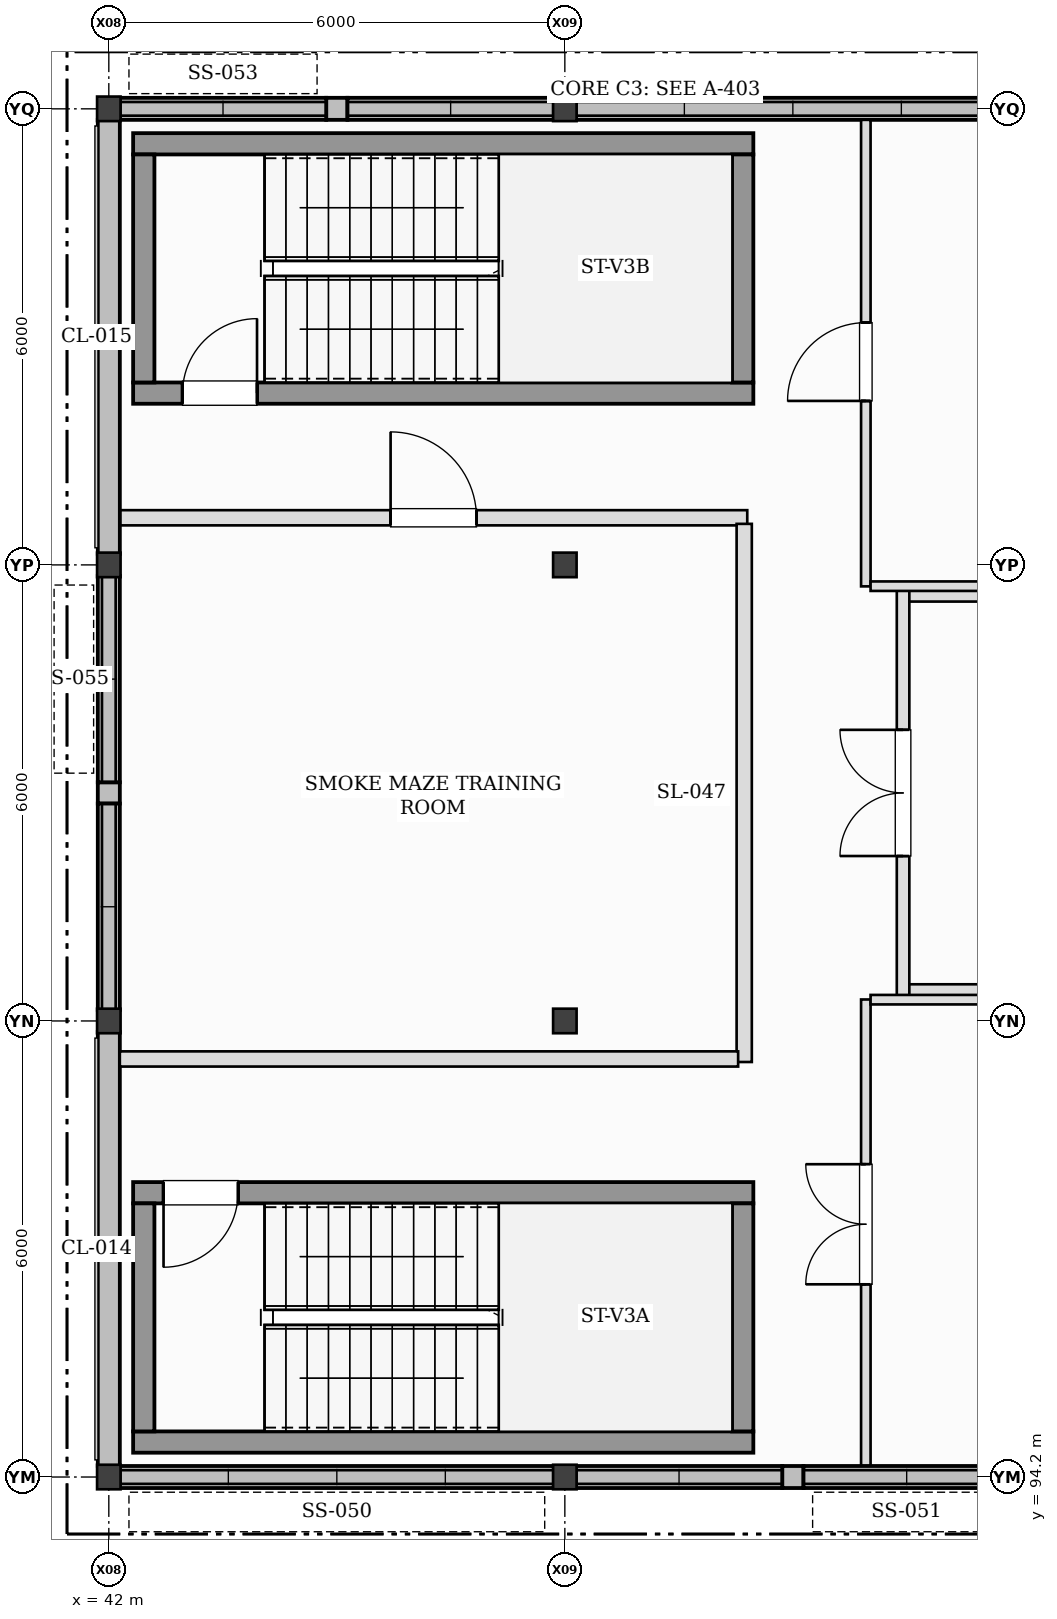
"""IFC4 building model, lengths in metres.
Left out: names, types, materials, properties, quantities, classifications, styles, units other than length and angle.
Written with IfcOpenShell. Run it as: python <this file> out.ifc"""

import sys

from ifc_helpers import new_model, si_unit, direction, frame, frame_2d, origin, origin_2d, place, context, subcontext, project, spatial, rectangle, i_section, extrude, element, fill, save


model = new_model("IFC4")
c1 = context("Model", 3, precision=1e-05, world=origin(), true_north=direction((0.0, 1.0)))
c2 = subcontext(c1, "Body", "Model", "MODEL_VIEW")
j1 = project(units=[si_unit("LENGTHUNIT", "METRE"), si_unit("PLANEANGLEUNIT", "RADIAN")], contexts=[c1])
p1 = place(None, origin())
s1 = spatial("IfcSite", under=j1, at=p1, CompositionType="ELEMENT")
p2 = place(p1, origin())
s2 = spatial("IfcBuilding", under=s1, at=p2, CompositionType="ELEMENT")
p3 = place(p2, frame((0.0, 0.0, 14.0)))
s3 = spatial("IfcBuildingStorey", under=s2, at=p3, CompositionType="ELEMENT", Elevation=14.0)
for number, where, z_axis, x_axis in (
    (1, (42.0, 94.2, 0.0), (0.0, 0.0, 1.0), (1.0, 0.0, 0.0)),
    (2, (42.0, 100.2, 0.0), (0.0, 0.0, 1.0), (1.0, 0.0, 0.0)),
    (3, (42.0, 106.2, 0.0), (0.0, 0.0, 1.0), (1.0, 0.0, 0.0)),
    (4, (42.0, 112.2, 0.0), (0.0, 0.0, 1.0), (1.0, 0.0, 0.0)),
    (5, (48.0, 94.2, 0.0), (0.0, 0.0, 1.0), (1.0, 0.0, 0.0)),
    (6, (48.0, 100.2, 0.0), (0.0, 0.0, 1.0), (1.0, 0.0, 0.0)),
    (7, (48.0, 106.2, 0.0), (0.0, 0.0, 1.0), (1.0, 0.0, 0.0)),
    (8, (48.0, 112.2, 0.0), (0.0, 0.0, 1.0), (1.0, 0.0, 0.0)),
):
    element("IfcColumn", number, at=place(p3, frame(where, z_axis=z_axis, x_axis=x_axis)), inside=s3, PredefinedType="COLUMN", context=c2, shape_type="SweptSolid", body=[
        extrude(i_section(OverallWidth=0.309, OverallDepth=0.323, WebThickness=0.013, FlangeThickness=0.023, at=origin_2d()), origin(), (0.0, 0.0, 1.0), 4.0),
    ])
p4 = place(p3, frame((42.145, 94.2, 0.0), z_axis=(0.0, 0.0, 1.0), x_axis=(1.0, 0.0, 0.0)))
e9 = element("IfcWall", 9, at=p4, inside=s3, PredefinedType="STANDARD", context=c2, shape_type="SweptSolid", body=[
    extrude(rectangle(XDim=5.71, YDim=0.29, at=frame_2d((2.855, 0.0))), origin(), (0.0, 0.0, 1.0), 0.56),
])
p5 = place(p3, frame((50.86, 94.2, 0.0), z_axis=(0.0, 0.0, 1.0), x_axis=(1.0, 0.0, 0.0)))
e10 = element("IfcWall", 10, at=p5, inside=s3, PredefinedType="STANDARD", context=c2, shape_type="SweptSolid", body=[
    extrude(rectangle(XDim=0.28, YDim=0.29, at=frame_2d((0.14, 0.0))), origin(), (0.0, 0.0, 1.0), 3.269),
])
p6 = place(p3, frame((48.145, 94.2, 0.0), z_axis=(0.0, 0.0, 1.0), x_axis=(1.0, 0.0, 0.0)))
e11 = element("IfcWall", 11, at=p6, inside=s3, PredefinedType="STANDARD", context=c2, shape_type="SweptSolid", body=[
    extrude(rectangle(XDim=2.715, YDim=0.29, at=frame_2d((1.357, 0.0))), origin(), (0.0, 0.0, 1.0), 0.68),
])
p7 = place(p3, frame((51.14, 94.2, 0.0), z_axis=(0.0, 0.0, 1.0), x_axis=(1.0, 0.0, 0.0)))
e12 = element("IfcWall", 12, at=p7, inside=s3, PredefinedType="STANDARD", context=c2, shape_type="SweptSolid", body=[
    extrude(rectangle(XDim=2.715, YDim=0.29, at=frame_2d((1.357, 0.0))), origin(), (0.0, 0.0, 1.0), 0.8),
])
p8 = place(p3, frame((45.14, 112.2, 0.0), z_axis=(0.0, 0.0, 1.0), x_axis=(-1.0, 0.0, 0.0)))
e13 = element("IfcWall", 13, at=p8, inside=s3, PredefinedType="STANDARD", context=c2, shape_type="SweptSolid", body=[
    extrude(rectangle(XDim=0.28, YDim=0.29, at=frame_2d((0.14, 0.0))), origin(), (0.0, 0.0, 1.0), 3.269),
])
p9 = place(p3, frame((47.855, 112.2, 0.0), z_axis=(0.0, 0.0, 1.0), x_axis=(-1.0, 0.0, 0.0)))
e14 = element("IfcWall", 14, at=p9, inside=s3, PredefinedType="STANDARD", context=c2, shape_type="SweptSolid", body=[
    extrude(rectangle(XDim=2.715, YDim=0.29, at=frame_2d((1.357, 0.0))), origin(), (0.0, 0.0, 1.0), 0.92),
])
p10 = place(p3, frame((44.86, 112.2, 0.0), z_axis=(0.0, 0.0, 1.0), x_axis=(-1.0, 0.0, 0.0)))
e15 = element("IfcWall", 15, at=p10, inside=s3, PredefinedType="STANDARD", context=c2, shape_type="SweptSolid", body=[
    extrude(rectangle(XDim=2.715, YDim=0.29, at=frame_2d((1.357, 0.0))), origin(), (0.0, 0.0, 1.0), 0.32),
])
p11 = place(p3, frame((53.855, 112.2, 0.0), z_axis=(0.0, 0.0, 1.0), x_axis=(-1.0, 0.0, 0.0)))
e16 = element("IfcWall", 16, at=p11, inside=s3, PredefinedType="STANDARD", context=c2, shape_type="SweptSolid", body=[
    extrude(rectangle(XDim=5.71, YDim=0.29, at=frame_2d((2.855, 0.0))), origin(), (0.0, 0.0, 1.0), 0.44),
])
p12 = place(p3, frame((42.0, 100.055, 0.0), z_axis=(0.0, 0.0, 1.0), x_axis=(0.0, -1.0, 0.0)))
e17 = element("IfcWall", 17, at=p12, inside=s3, PredefinedType="STANDARD", context=c2, shape_type="SweptSolid", body=[
    extrude(rectangle(XDim=5.71, YDim=0.29, at=frame_2d((2.855, 0.0))), origin(), (0.0, 0.0, 1.0), 3.273),
])
p13 = place(p3, frame((42.0, 103.34, 0.0), z_axis=(0.0, 0.0, 1.0), x_axis=(0.0, -1.0, 0.0)))
e18 = element("IfcWall", 18, at=p13, inside=s3, PredefinedType="STANDARD", context=c2, shape_type="SweptSolid", body=[
    extrude(rectangle(XDim=0.28, YDim=0.29, at=frame_2d((0.14, 0.0))), origin(), (0.0, 0.0, 1.0), 3.273),
])
p14 = place(p3, frame((42.0, 106.055, 0.0), z_axis=(0.0, 0.0, 1.0), x_axis=(0.0, -1.0, 0.0)))
e19 = element("IfcWall", 19, at=p14, inside=s3, PredefinedType="STANDARD", context=c2, shape_type="SweptSolid", body=[
    extrude(rectangle(XDim=2.715, YDim=0.29, at=frame_2d((1.357, 0.0))), origin(), (0.0, 0.0, 1.0), 0.56),
])
p15 = place(p3, frame((42.0, 103.06, 0.0), z_axis=(0.0, 0.0, 1.0), x_axis=(0.0, -1.0, 0.0)))
e20 = element("IfcWall", 20, at=p15, inside=s3, PredefinedType="STANDARD", context=c2, shape_type="SweptSolid", body=[
    extrude(rectangle(XDim=2.715, YDim=0.29, at=frame_2d((1.357, 0.0))), origin(), (0.0, 0.0, 1.0), 0.68),
])
p16 = place(p3, frame((42.0, 112.055, 0.0), z_axis=(0.0, 0.0, 1.0), x_axis=(0.0, -1.0, 0.0)))
e21 = element("IfcWall", 21, at=p16, inside=s3, PredefinedType="STANDARD", context=c2, shape_type="SweptSolid", body=[
    extrude(rectangle(XDim=5.71, YDim=0.29, at=frame_2d((2.855, 0.0))), origin(), (0.0, 0.0, 1.0), 3.273),
])
p17 = place(p3, frame((42.32, 94.66, 0.0), z_axis=(0.0, 0.0, 1.0), x_axis=(1.0, 0.0, 0.0)))
e22 = element("IfcWall", 22, at=p17, inside=s3, PredefinedType="SHEAR", context=c2, shape_type="SweptSolid", body=[
    extrude(rectangle(XDim=8.16, YDim=0.28, at=frame_2d((4.08, 0.0))), origin(), (0.0, 0.0, 1.0), 4.0),
])
p18 = place(p3, frame((50.48, 97.94, 0.0), z_axis=(0.0, 0.0, 1.0), x_axis=(-1.0, 0.0, 0.0)))
e23 = element("IfcWall", 23, at=p18, inside=s3, PredefinedType="SHEAR", context=c2, shape_type="SweptSolid", body=[
    extrude(rectangle(XDim=8.16, YDim=0.28, at=frame_2d((4.08, 0.0))), origin(), (0.0, 0.0, 1.0), 4.0),
])
p19 = place(p18, frame((6.78, 0.0, 0.0)))
e24 = element("IfcOpeningElement", 24, at=p19, cuts=e23, PredefinedType="OPENING", context=c2, shape_type="SweptSolid", body=[
    extrude(rectangle(XDim=0.98, YDim=2.15, at=frame_2d((0.49, 1.075))), frame((0.0, 0.15, 0.0), z_axis=(0.0, -1.0, 0.0), x_axis=(1.0, 0.0, 0.0)), (0.0, 0.0, 1.0), 0.3),
])
for number, where, z_axis, x_axis in (
    (25, (42.46, 97.8, 0.0), (0.0, 0.0, 1.0), (0.0, -1.0, 0.0)),
    (26, (50.34, 94.8, 0.0), (0.0, 0.0, 1.0), (0.0, 1.0, 0.0)),
):
    element("IfcWall", number, at=place(p3, frame(where, z_axis=z_axis, x_axis=x_axis)), inside=s3, PredefinedType="SHEAR", context=c2, shape_type="SweptSolid", body=[
        extrude(rectangle(XDim=3.0, YDim=0.28, at=frame_2d((1.5, 0.0))), origin(), (0.0, 0.0, 1.0), 4.0),
    ])
p20 = place(p3, frame((42.32, 108.46, 0.0), z_axis=(0.0, 0.0, 1.0), x_axis=(1.0, 0.0, 0.0)))
e27 = element("IfcWall", 27, at=p20, inside=s3, PredefinedType="SHEAR", context=c2, shape_type="SweptSolid", body=[
    extrude(rectangle(XDim=8.16, YDim=0.28, at=frame_2d((4.08, 0.0))), origin(), (0.0, 0.0, 1.0), 4.0),
])
p21 = place(p20, frame((0.65, 0.0, 0.0)))
e28 = element("IfcOpeningElement", 28, at=p21, cuts=e27, PredefinedType="OPENING", context=c2, shape_type="SweptSolid", body=[
    extrude(rectangle(XDim=0.98, YDim=2.15, at=frame_2d((0.49, 1.075))), frame((0.0, 0.15, 0.0), z_axis=(0.0, -1.0, 0.0), x_axis=(1.0, 0.0, 0.0)), (0.0, 0.0, 1.0), 0.3),
])
p22 = place(p3, frame((50.48, 111.74, 0.0), z_axis=(0.0, 0.0, 1.0), x_axis=(-1.0, 0.0, 0.0)))
e29 = element("IfcWall", 29, at=p22, inside=s3, PredefinedType="SHEAR", context=c2, shape_type="SweptSolid", body=[
    extrude(rectangle(XDim=8.16, YDim=0.28, at=frame_2d((4.08, 0.0))), origin(), (0.0, 0.0, 1.0), 4.0),
])
for number, where, z_axis, x_axis in (
    (30, (42.46, 111.6, 0.0), (0.0, 0.0, 1.0), (0.0, -1.0, 0.0)),
    (31, (50.34, 108.6, 0.0), (0.0, 0.0, 1.0), (0.0, 1.0, 0.0)),
):
    element("IfcWall", number, at=place(p3, frame(where, z_axis=z_axis, x_axis=x_axis)), inside=s3, PredefinedType="SHEAR", context=c2, shape_type="SweptSolid", body=[
        extrude(rectangle(XDim=3.0, YDim=0.28, at=frame_2d((1.5, 0.0))), origin(), (0.0, 0.0, 1.0), 4.0),
    ])
for number, where, z_axis, x_axis in (
    (32, (52.45, 100.6, 0.0), (0.0, 0.0, 1.0), (1.0, 0.0, 0.0)),
    (33, (56.448, 105.8, 0.0), (0.0, 0.0, 1.0), (-1.0, 0.0, 0.0)),
):
    element("IfcWall", number, at=place(p3, frame(where, z_axis=z_axis, x_axis=x_axis)), inside=s3, PredefinedType="PARTITIONING", context=c2, shape_type="SweptSolid", body=[
        extrude(rectangle(XDim=3.998, YDim=0.165, at=frame_2d((1.999, 0.0))), origin(), (0.0, 0.0, 1.0), 3.76),
    ])
p23 = place(p3, frame((52.45, 100.52, 0.0), z_axis=(0.0, 0.0, 1.0), x_axis=(0.0, 1.0, 0.0)))
e34 = element("IfcWall", 34, at=p23, inside=s3, PredefinedType="PARTITIONING", context=c2, shape_type="SweptSolid", body=[
    extrude(rectangle(XDim=5.36, YDim=0.165, at=frame_2d((2.68, 0.0))), origin(), (0.0, 0.0, 1.0), 3.76),
])
p24 = place(p23, frame((1.85, 0.0, 0.0)))
e35 = element("IfcOpeningElement", 35, at=p24, cuts=e34, PredefinedType="OPENING", context=c2, shape_type="SweptSolid", body=[
    extrude(rectangle(XDim=1.66, YDim=2.2, at=frame_2d((0.83, 1.1))), frame((0.0, 0.093, 0.0), z_axis=(0.0, -1.0, 0.0), x_axis=(1.0, 0.0, 0.0)), (0.0, 0.0, 1.0), 0.185),
])
p25 = place(p3, frame((42.145, 106.82, 0.0), z_axis=(0.0, 0.0, 1.0), x_axis=(1.0, 0.0, 0.0)))
e36 = element("IfcWall", 36, at=p25, inside=s3, PredefinedType="PARTITIONING", context=c2, shape_type="SweptSolid", body=[
    extrude(rectangle(XDim=8.255, YDim=0.2, at=frame_2d((4.127, 0.0))), origin(), (0.0, 0.0, 1.0), 3.76),
])
p26 = place(p25, frame((3.562, 0.0, 0.0)))
e37 = element("IfcOpeningElement", 37, at=p26, cuts=e36, PredefinedType="OPENING", context=c2, shape_type="SweptSolid", body=[
    extrude(rectangle(XDim=1.13, YDim=2.18, at=frame_2d((0.565, 1.09))), frame((0.0, 0.11, 0.0), z_axis=(0.0, -1.0, 0.0), x_axis=(1.0, 0.0, 0.0)), (0.0, 0.0, 1.0), 0.22),
])
p27 = place(p3, frame((50.36, 106.74, 0.0), z_axis=(0.0, 0.0, 1.0), x_axis=(0.0, -1.0, 0.0)))
e38 = element("IfcWall", 38, at=p27, inside=s3, PredefinedType="PARTITIONING", context=c2, shape_type="SweptSolid", body=[
    extrude(rectangle(XDim=7.08, YDim=0.2, at=frame_2d((3.54, 0.0))), origin(), (0.0, 0.0, 1.0), 3.76),
])
p28 = place(p3, frame((50.28, 99.7, 0.0), z_axis=(0.0, 0.0, 1.0), x_axis=(-1.0, 0.0, 0.0)))
e39 = element("IfcWall", 39, at=p28, inside=s3, PredefinedType="PARTITIONING", context=c2, shape_type="SweptSolid", body=[
    extrude(rectangle(XDim=8.135, YDim=0.2, at=frame_2d((4.067, 0.0))), origin(), (0.0, 0.0, 1.0), 3.76),
])
p29 = place(p3, frame((51.96, 94.345, 0.0), z_axis=(0.0, 0.0, 1.0), x_axis=(0.0, 1.0, 0.0)))
e40 = element("IfcWall", 40, at=p29, inside=s3, PredefinedType="PARTITIONING", context=c2, shape_type="SweptSolid", body=[
    extrude(rectangle(XDim=6.137, YDim=0.125, at=frame_2d((3.069, 0.0))), origin(), (0.0, 0.0, 1.0), 3.374),
])
p30 = place(p29, frame((2.39, 0.0, 0.0)))
e41 = element("IfcOpeningElement", 41, at=p30, cuts=e40, PredefinedType="OPENING", context=c2, shape_type="SweptSolid", body=[
    extrude(rectangle(XDim=1.58, YDim=2.2, at=frame_2d((0.79, 1.1))), frame((0.0, 0.073, 0.0), z_axis=(0.0, -1.0, 0.0), x_axis=(1.0, 0.0, 0.0)), (0.0, 0.0, 1.0), 0.145),
])
p31 = place(p3, frame((52.022, 100.48, 0.0), z_axis=(0.0, 0.0, 1.0), x_axis=(1.0, 0.0, 0.0)))
e42 = element("IfcWall", 42, at=p31, inside=s3, PredefinedType="PARTITIONING", context=c2, shape_type="SweptSolid", body=[
    extrude(rectangle(XDim=7.833, YDim=0.125, at=frame_2d((3.916, 0.0))), origin(), (0.0, 0.0, 1.0), 3.269),
])
p32 = place(p3, frame((51.96, 105.917, 0.0), z_axis=(0.0, 0.0, 1.0), x_axis=(0.0, 1.0, 0.0)))
e43 = element("IfcWall", 43, at=p32, inside=s3, PredefinedType="PARTITIONING", context=c2, shape_type="SweptSolid", body=[
    extrude(rectangle(XDim=6.137, YDim=0.125, at=frame_2d((3.069, 0.0))), origin(), (0.0, 0.0, 1.0), 3.374),
])
p33 = place(p32, frame((2.44, 0.0, 0.0)))
e44 = element("IfcOpeningElement", 44, at=p33, cuts=e43, PredefinedType="OPENING", context=c2, shape_type="SweptSolid", body=[
    extrude(rectangle(XDim=1.03, YDim=2.15, at=frame_2d((0.515, 1.075))), frame((0.0, 0.073, 0.0), z_axis=(0.0, -1.0, 0.0), x_axis=(1.0, 0.0, 0.0)), (0.0, 0.0, 1.0), 0.145),
])
p34 = place(p3, frame((59.855, 105.92, 0.0), z_axis=(0.0, 0.0, 1.0), x_axis=(-1.0, 0.0, 0.0)))
e45 = element("IfcWall", 45, at=p34, inside=s3, PredefinedType="PARTITIONING", context=c2, shape_type="SweptSolid", body=[
    extrude(rectangle(XDim=7.833, YDim=0.125, at=frame_2d((3.916, 0.0))), origin(), (0.0, 0.0, 1.0), 3.269),
])
p35 = place(p19, origin())
e46 = element("IfcDoor", 46, at=p35, inside=s3, OperationType="SINGLE_SWING_RIGHT", PredefinedType="DOOR", context=c2, shape_type="SweptSolid", body=[
    extrude(rectangle(XDim=0.98, YDim=2.15, at=frame_2d((0.49, 1.075))), frame((0.0, 0.025, 0.0), z_axis=(0.0, -1.0, 0.0), x_axis=(1.0, 0.0, 0.0)), (0.0, 0.0, 1.0), 0.05),
])
fill(e24, e46)
p36 = place(p21, origin())
e47 = element("IfcDoor", 47, at=p36, inside=s3, OperationType="SINGLE_SWING_RIGHT", PredefinedType="DOOR", context=c2, shape_type="SweptSolid", body=[
    extrude(rectangle(XDim=0.98, YDim=2.15, at=frame_2d((0.49, 1.075))), frame((0.0, 0.025, 0.0), z_axis=(0.0, -1.0, 0.0), x_axis=(1.0, 0.0, 0.0)), (0.0, 0.0, 1.0), 0.05),
])
fill(e28, e47)
p37 = place(p24, frame((1.66, 0.0, 0.0), z_axis=(0.0, 0.0, 1.0), x_axis=(-1.0, 0.0, 0.0)))
e48 = element("IfcDoor", 48, at=p37, inside=s3, OperationType="DOUBLE_DOOR_SINGLE_SWING", PredefinedType="DOOR", context=c2, shape_type="SweptSolid", body=[
    extrude(rectangle(XDim=1.66, YDim=2.2, at=frame_2d((0.83, 1.1))), frame((0.0, 0.025, 0.0), z_axis=(0.0, -1.0, 0.0), x_axis=(1.0, 0.0, 0.0)), (0.0, 0.0, 1.0), 0.05),
])
fill(e35, e48)
p38 = place(p26, frame((1.13, 0.0, 0.0), z_axis=(0.0, 0.0, 1.0), x_axis=(-1.0, 0.0, 0.0)))
e49 = element("IfcDoor", 49, at=p38, inside=s3, OperationType="SINGLE_SWING_LEFT", PredefinedType="DOOR", context=c2, shape_type="SweptSolid", body=[
    extrude(rectangle(XDim=1.13, YDim=2.18, at=frame_2d((0.565, 1.09))), frame((0.0, 0.025, 0.0), z_axis=(0.0, -1.0, 0.0), x_axis=(1.0, 0.0, 0.0)), (0.0, 0.0, 1.0), 0.05),
])
fill(e37, e49)
p39 = place(p30, frame((1.58, 0.0, 0.0), z_axis=(0.0, 0.0, 1.0), x_axis=(-1.0, 0.0, 0.0)))
e50 = element("IfcDoor", 50, at=p39, inside=s3, OperationType="DOUBLE_DOOR_SINGLE_SWING", PredefinedType="DOOR", context=c2, shape_type="SweptSolid", body=[
    extrude(rectangle(XDim=1.58, YDim=2.2, at=frame_2d((0.79, 1.1))), frame((0.0, 0.025, 0.0), z_axis=(0.0, -1.0, 0.0), x_axis=(1.0, 0.0, 0.0)), (0.0, 0.0, 1.0), 0.05),
])
fill(e41, e50)
p40 = place(p33, frame((1.03, 0.0, 0.0), z_axis=(0.0, 0.0, 1.0), x_axis=(-1.0, 0.0, 0.0)))
e51 = element("IfcDoor", 51, at=p40, inside=s3, OperationType="SINGLE_SWING_LEFT", PredefinedType="DOOR", context=c2, shape_type="SweptSolid", body=[
    extrude(rectangle(XDim=1.03, YDim=2.15, at=frame_2d((0.515, 1.075))), frame((0.0, 0.025, 0.0), z_axis=(0.0, -1.0, 0.0), x_axis=(1.0, 0.0, 0.0)), (0.0, 0.0, 1.0), 0.05),
])
fill(e44, e51)
save(model, sys.argv[1])
